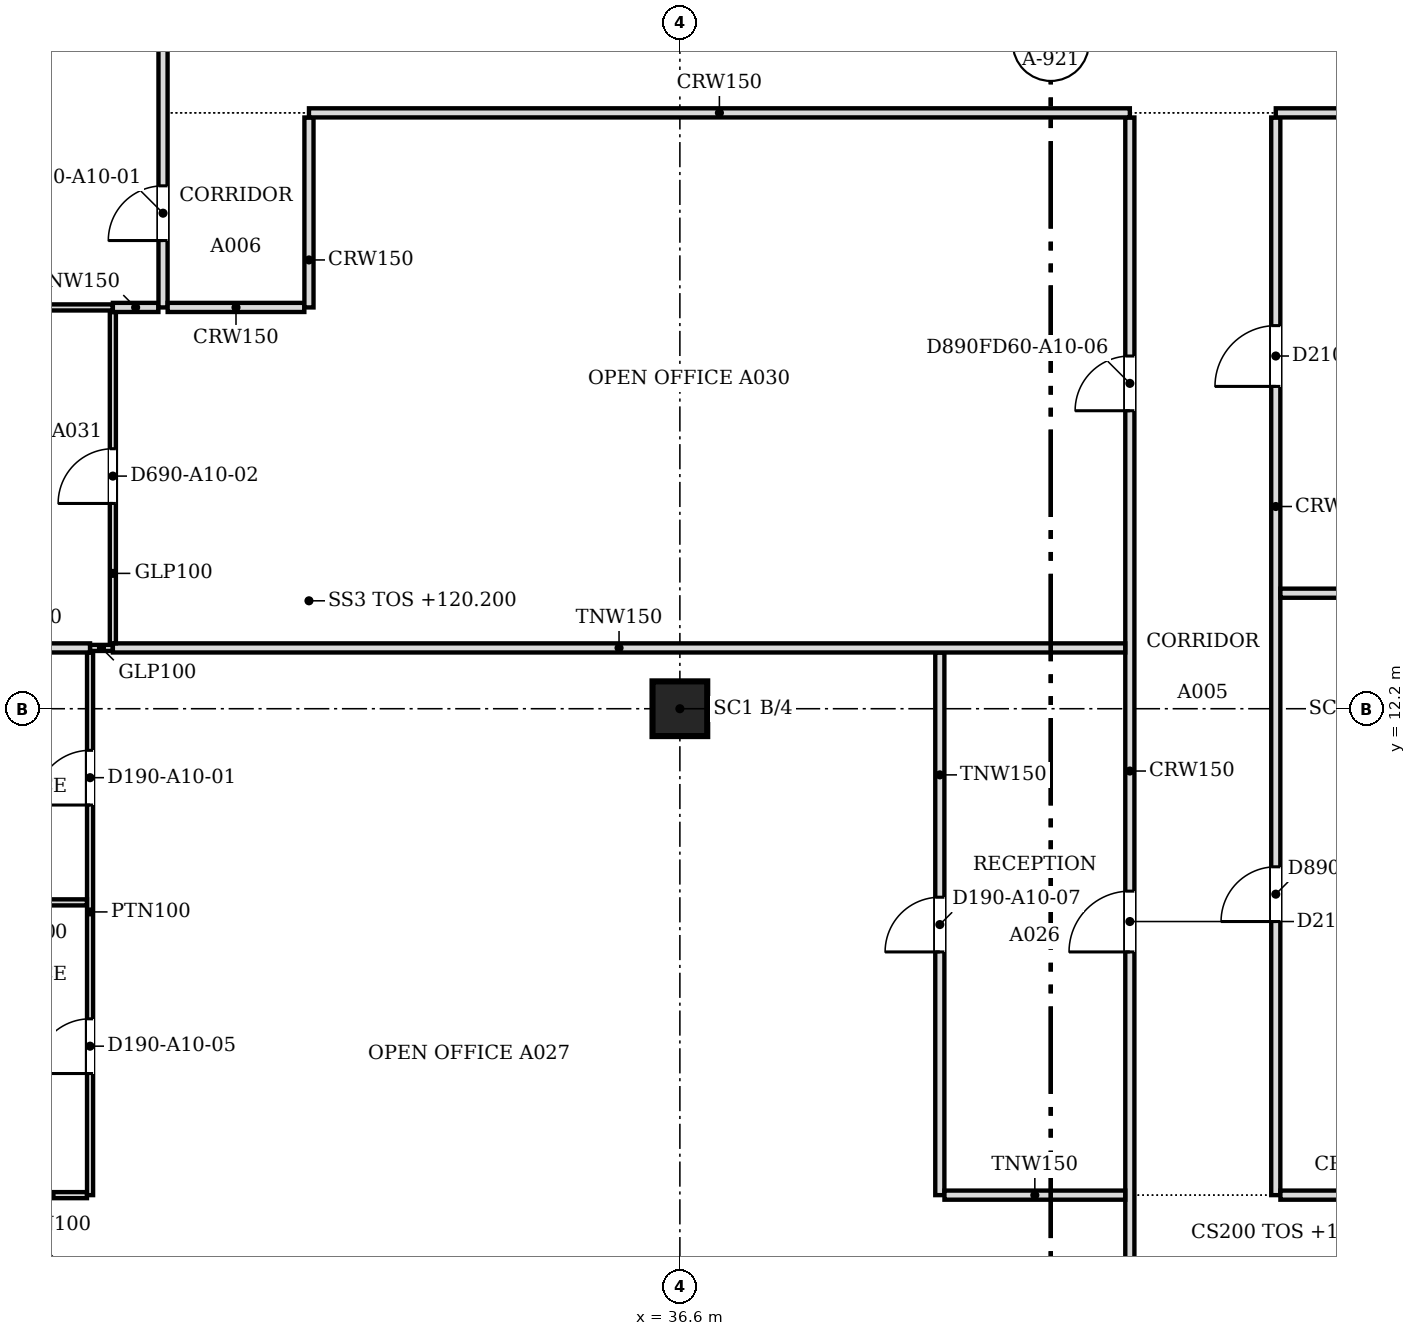
"""IFC4 building model, lengths in metres.
Left out: names, types, materials, properties, quantities, classifications, styles, units other than length and angle.
Written with IfcOpenShell. Run it as: python <this file> out.ifc"""

import sys

from ifc_helpers import new_model, si_unit, direction, frame, frame_2d, origin, origin_2d, place, context, subcontext, project, spatial, polyline, rectangle, outline, extrude, faceted_brep, source, transform, mapped, element, fill, save


model = new_model("IFC4")
c1 = context("Model", 3, precision=1e-05, world=origin(), true_north=direction((0.0, 1.0)))
c2 = subcontext(c1, "Body", "Model", "MODEL_VIEW")
j1 = project(units=[si_unit("LENGTHUNIT", "METRE"), si_unit("PLANEANGLEUNIT", "RADIAN")], contexts=[c1])
p1 = place(None, origin())
s1 = spatial("IfcSite", under=j1, at=p1, CompositionType="ELEMENT")
p2 = place(p1, origin())
s2 = spatial("IfcBuilding", under=s1, at=p2, CompositionType="ELEMENT")
p3 = place(p2, frame((0.0, 0.0, 120.2)))
s3 = spatial("IfcBuildingStorey", under=s2, at=p3, CompositionType="ELEMENT", Elevation=120.2)
p4 = place(p3, frame((36.6, 12.2, 0.0), z_axis=(0.0, 0.0, 1.0), x_axis=(1.0, 0.0, 0.0)))
e1 = element("IfcColumn", 1, at=p4, inside=s3, PredefinedType="COLUMN", context=c2, shape_type="SweptSolid", body=[
    extrude(rectangle(XDim=0.9, YDim=0.9, at=origin_2d()), origin(), (0.0, 0.0, 1.0), 3.6),
])
m1 = source(origin(), c2, "Body", "Brep", [
    faceted_brep([(0.053, -0.25, 0.0), (2.997, -0.25, 3.8), (0.053, -0.25, 7.6), (0.0, -0.25, 7.532), (0.0, -0.25, 0.068), (0.106, 0.25, 7.532), (2.944, 0.25, 3.868), (2.944, 0.25, 3.732), (0.106, 0.25, 0.068), (2.997, 0.0, 3.8), (0.053, 0.0, 0.0), (0.053, 0.0, 7.6)], [[[0, 1, 2, 3, 4]], [[5, 6, 7, 8]], [[8, 7, 9, 1, 0, 10]], [[6, 5, 11, 2, 1, 9]], [[3, 2, 11]], [[10, 0, 4]], [[8, 10, 4, 3, 11, 5]], [[9, 7, 6]]]),
])
p5 = place(p3, frame((25.675, 3.431, -3.8), z_axis=(0.0, 0.0, 1.0), x_axis=(0.707106781187, -0.707106781187, 0.0)))
e2 = element("IfcWall", 2, at=p5, inside=s3, PredefinedType="SOLIDWALL", context=c2, shape_type="MappedRepresentation", body=[
    mapped(m1, transform((0.0, 0.0, 0.0), scale=1.0)),
])
m2 = source(origin(), c2, "Body", "SweptSolid", [
    extrude(outline(polyline([(0.253, 0.667), (2.681, 3.8), (0.253, 6.934), (0.253, 0.667)])), frame((0.0, 0.26, 0.0), z_axis=(0.0, -1.0, 0.0), x_axis=(1.0, 0.0, 0.0)), (0.0, 0.0, 1.0), 0.52),
])
p6 = place(p5, origin())
e3 = element("IfcOpeningElement", 3, at=p6, cuts=e2, PredefinedType="OPENING", context=c2, shape_type="MappedRepresentation", body=[
    mapped(m2, transform((0.0, 0.0, 0.0), scale=1.0)),
])
p7 = place(p2, frame((0.0, 0.0, 124.0)))
s4 = spatial("IfcBuildingStorey", under=s2, at=p7, CompositionType="ELEMENT", Elevation=124.0)
m3 = source(origin(), c2, "Body", "Brep", [
    faceted_brep([(2.944, -0.25, 0.0), (2.997, -0.25, 0.068), (2.997, -0.25, 7.532), (2.944, -0.25, 7.6), (0.0, -0.25, 3.8), (0.053, 0.25, 3.868), (2.891, 0.25, 7.532), (2.891, 0.25, 0.068), (0.053, 0.25, 3.732), (2.944, 0.0, 0.0), (2.944, 0.0, 7.6), (0.0, 0.0, 3.8)], [[[0, 1, 2, 3, 4]], [[5, 6, 7, 8]], [[1, 0, 9]], [[10, 3, 2]], [[6, 5, 11, 4, 3, 10]], [[8, 7, 9, 0, 4, 11]], [[8, 11, 5]], [[1, 9, 7, 6, 10, 2]]]),
])
p8 = place(p7, frame((25.712, 3.394, -3.8), z_axis=(0.0, 0.0, 1.0), x_axis=(0.707066050402, -0.707147509625, 0.0)))
e4 = element("IfcWall", 4, at=p8, inside=s4, PredefinedType="SOLIDWALL", context=c2, shape_type="MappedRepresentation", body=[
    mapped(m3, transform((0.0, 0.0, 0.0), scale=1.0)),
])
m4 = source(origin(), c2, "Body", "SweptSolid", [
    extrude(outline(polyline([(2.744, 6.934), (0.316, 3.8), (2.744, 0.666), (2.744, 6.934)])), frame((0.0, 0.26, 0.0), z_axis=(0.0, -1.0, 0.0), x_axis=(1.0, 0.0, 0.0)), (0.0, 0.0, 1.0), 0.52),
])
p9 = place(p8, origin())
e5 = element("IfcOpeningElement", 5, at=p9, cuts=e4, PredefinedType="OPENING", context=c2, shape_type="MappedRepresentation", body=[
    mapped(m4, transform((0.0, 0.0, 0.0), scale=1.0)),
])
p10 = place(p3, frame((44.0, 0.5, 0.0), z_axis=(0.0, 0.0, 1.0), x_axis=(0.0, 1.0, 0.0)))
e6 = element("IfcWall", 6, at=p10, inside=s3, PredefinedType="PARTITIONING", context=c2, shape_type="SweptSolid", body=[
    extrude(rectangle(XDim=21.424, YDim=0.15, at=frame_2d((10.712, 0.0))), origin(), (0.0, 0.0, 1.0), 3.067),
])
m5 = source(origin(), c2, "Body", "SweptSolid", [
    extrude(rectangle(XDim=0.9, YDim=2.1, at=frame_2d((0.45, 1.05))), frame((0.0, 0.085, 0.0), z_axis=(0.0, -1.0, 0.0), x_axis=(1.0, 0.0, 0.0)), (0.0, 0.0, 1.0), 0.17),
])
p11 = place(p10, frame((16.601, 0.0, 0.0)))
e7 = element("IfcOpeningElement", 7, at=p11, cuts=e6, PredefinedType="OPENING", context=c2, shape_type="MappedRepresentation", body=[
    mapped(m5, transform((0.0, 0.0, 0.0), scale=1.0)),
])
m6 = source(origin(), c2, "Body", "SweptSolid", [
    extrude(rectangle(XDim=1.0, YDim=2.1, at=frame_2d((0.5, 1.05))), frame((0.0, 0.085, 0.0), z_axis=(0.0, -1.0, 0.0), x_axis=(1.0, 0.0, 0.0)), (0.0, 0.0, 1.0), 0.17),
])
p12 = place(p10, frame((7.7, 0.0, 0.0)))
e8 = element("IfcOpeningElement", 8, at=p12, cuts=e6, PredefinedType="OPENING", context=c2, shape_type="MappedRepresentation", body=[
    mapped(m6, transform((0.0, 0.0, 0.0), scale=1.0)),
])
p13 = place(p3, frame((25.669, 4.2, 0.0), z_axis=(0.0, 0.0, 1.0), x_axis=(1.0, 0.0, 0.0)))
e9 = element("IfcWall", 9, at=p13, inside=s3, PredefinedType="PARTITIONING", context=c2, shape_type="SweptSolid", body=[
    extrude(rectangle(XDim=1.18, YDim=0.1, at=frame_2d((0.59, 0.0))), origin(), (0.0, 0.0, 1.0), 3.067),
])
p14 = place(p3, frame((26.9, 4.2, 0.0), z_axis=(0.0, 0.0, 1.0), x_axis=(0.0, 1.0, 0.0)))
e10 = element("IfcWall", 10, at=p14, inside=s3, PredefinedType="PARTITIONING", context=c2, shape_type="SweptSolid", body=[
    extrude(rectangle(XDim=8.924, YDim=0.1, at=frame_2d((4.462, 0.0))), origin(), (0.0, 0.0, 1.0), 3.067),
])
m7 = source(origin(), c2, "Body", "SweptSolid", [
    extrude(rectangle(XDim=0.9, YDim=2.1, at=frame_2d((0.45, 1.05))), frame((0.0, 0.06, 0.0), z_axis=(0.0, -1.0, 0.0), x_axis=(1.0, 0.0, 0.0)), (0.0, 0.0, 1.0), 0.12),
])
p15 = place(p14, frame((6.416, 0.0, 0.0)))
e11 = element("IfcOpeningElement", 11, at=p15, cuts=e10, PredefinedType="OPENING", context=c2, shape_type="MappedRepresentation", body=[
    mapped(m7, transform((0.0, 0.0, 0.0), scale=1.0)),
])
p16 = place(p14, frame((2.0, 0.0, 0.0)))
e12 = element("IfcOpeningElement", 12, at=p16, cuts=e10, PredefinedType="OPENING", context=c2, shape_type="MappedRepresentation", body=[
    mapped(m7, transform((0.0, 0.0, 0.0), scale=1.0)),
])
p17 = place(p3, frame((40.875, 4.2, 0.0), z_axis=(0.0, 0.0, 1.0), x_axis=(0.0, 1.0, 0.0)))
e13 = element("IfcWall", 13, at=p17, inside=s3, PredefinedType="PARTITIONING", context=c2, shape_type="SweptSolid", body=[
    extrude(rectangle(XDim=8.924, YDim=0.15, at=frame_2d((4.462, 0.0))), origin(), (0.0, 0.0, 1.0), 3.067),
])
p18 = place(p17, frame((4.0, 0.0, 0.0)))
e14 = element("IfcOpeningElement", 14, at=p18, cuts=e13, PredefinedType="OPENING", context=c2, shape_type="MappedRepresentation", body=[
    mapped(m5, transform((0.0, 0.0, 0.0), scale=1.0)),
])
p19 = place(p3, frame((40.951, 4.2, 0.0), z_axis=(0.0, 0.0, 1.0), x_axis=(1.0, 0.0, 0.0)))
e15 = element("IfcWall", 15, at=p19, inside=s3, PredefinedType="PARTITIONING", context=c2, shape_type="SweptSolid", body=[
    extrude(rectangle(XDim=2.973, YDim=0.15, at=frame_2d((1.487, 0.0))), origin(), (0.0, 0.0, 1.0), 3.067),
])
p20 = place(p3, frame((46.4, 21.924, 0.0), z_axis=(0.0, 0.0, 1.0), x_axis=(0.0, -1.0, 0.0)))
e16 = element("IfcWall", 16, at=p20, inside=s3, PredefinedType="PARTITIONING", context=c2, shape_type="SweptSolid", body=[
    extrude(rectangle(XDim=17.724, YDim=0.15, at=frame_2d((8.862, 0.0))), origin(), (0.0, 0.0, 1.0), 3.067),
])
p21 = place(p20, frame((3.423, 0.0, 0.0)))
e17 = element("IfcOpeningElement", 17, at=p21, cuts=e16, PredefinedType="OPENING", context=c2, shape_type="MappedRepresentation", body=[
    mapped(m6, transform((0.0, 0.0, 0.0), scale=1.0)),
])
p22 = place(p20, frame((12.324, 0.0, 0.0)))
e18 = element("IfcOpeningElement", 18, at=p22, cuts=e16, PredefinedType="OPENING", context=c2, shape_type="MappedRepresentation", body=[
    mapped(m5, transform((0.0, 0.0, 0.0), scale=1.0)),
])
p23 = place(p3, frame((46.476, 4.2, 0.0), z_axis=(0.0, 0.0, 1.0), x_axis=(1.0, 0.0, 0.0)))
e19 = element("IfcWall", 19, at=p23, inside=s3, PredefinedType="PARTITIONING", context=c2, shape_type="SweptSolid", body=[
    extrude(rectangle(XDim=2.524, YDim=0.15, at=frame_2d((1.262, 0.0))), origin(), (0.0, 0.0, 1.0), 3.067),
])
p24 = place(p3, frame((24.9, 9.015, 0.0), z_axis=(0.0, 0.0, 1.0), x_axis=(1.0, 0.0, 0.0)))
e20 = element("IfcWall", 20, at=p24, inside=s3, PredefinedType="PARTITIONING", context=c2, shape_type="SweptSolid", body=[
    extrude(rectangle(XDim=1.949, YDim=0.1, at=frame_2d((0.975, 0.0))), origin(), (0.0, 0.0, 1.0), 3.067),
])
p25 = place(p3, frame((24.55, 13.2, 0.0), z_axis=(0.0, 0.0, 1.0), x_axis=(1.0, 0.0, 0.0)))
e21 = element("IfcWall", 21, at=p25, inside=s3, PredefinedType="PARTITIONING", context=c2, shape_type="SweptSolid", body=[
    extrude(rectangle(XDim=2.35, YDim=0.15, at=frame_2d((1.175, 0.0))), origin(), (0.0, 0.0, 1.0), 3.067),
])
p26 = place(p3, frame((26.901, 13.2, 0.0), z_axis=(0.0, 0.0, 1.0), x_axis=(1.0, 0.0, 0.0)))
e22 = element("IfcWall", 22, at=p26, inside=s3, PredefinedType="PARTITIONING", context=c2, shape_type="SweptSolid", body=[
    extrude(rectangle(XDim=0.373, YDim=0.1, at=frame_2d((0.187, 0.0))), origin(), (0.0, 0.0, 1.0), 3.067),
])
p27 = place(p3, frame((27.275, 13.2, 0.0), z_axis=(0.0, 0.0, 1.0), x_axis=(1.0, 0.0, 0.0)))
e23 = element("IfcWall", 23, at=p27, inside=s3, PredefinedType="PARTITIONING", context=c2, shape_type="SweptSolid", body=[
    extrude(rectangle(XDim=16.649, YDim=0.15, at=frame_2d((8.325, 0.0))), origin(), (0.0, 0.0, 1.0), 3.067),
])
p28 = place(p3, frame((27.275, 13.276, 0.0), z_axis=(0.0, 0.0, 1.0), x_axis=(0.0, 1.0, 0.0)))
e24 = element("IfcWall", 24, at=p28, inside=s3, PredefinedType="PARTITIONING", context=c2, shape_type="SweptSolid", body=[
    extrude(rectangle(XDim=5.448, YDim=0.1, at=frame_2d((2.724, 0.0))), origin(), (0.0, 0.0, 1.0), 3.067),
])
p29 = place(p28, frame((2.3, 0.0, 0.0)))
e25 = element("IfcOpeningElement", 25, at=p29, cuts=e24, PredefinedType="OPENING", context=c2, shape_type="MappedRepresentation", body=[
    mapped(m7, transform((0.0, 0.0, 0.0), scale=1.0)),
])
p30 = place(p3, frame((46.476, 14.1, 0.0), z_axis=(0.0, 0.0, 1.0), x_axis=(1.0, 0.0, 0.0)))
e26 = element("IfcWall", 26, at=p30, inside=s3, PredefinedType="PARTITIONING", context=c2, shape_type="SweptSolid", body=[
    extrude(rectangle(XDim=9.164, YDim=0.15, at=frame_2d((4.582, 0.0))), origin(), (0.0, 0.0, 1.0), 3.067),
])
p31 = place(p3, frame((22.0, 18.8, 0.0), z_axis=(0.0, 0.0, 1.0), x_axis=(1.0, 0.0, 0.0)))
e27 = element("IfcWall", 27, at=p31, inside=s3, PredefinedType="PARTITIONING", context=c2, shape_type="SweptSolid", body=[
    extrude(rectangle(XDim=5.274, YDim=0.1, at=frame_2d((2.637, 0.0))), origin(), (0.0, 0.0, 1.0), 3.067),
])
p32 = place(p3, frame((27.275, 18.8, 0.0), z_axis=(0.0, 0.0, 1.0), x_axis=(1.0, 0.0, 0.0)))
e28 = element("IfcWall", 28, at=p32, inside=s3, PredefinedType="PARTITIONING", context=c2, shape_type="SweptSolid", body=[
    extrude(rectangle(XDim=0.749, YDim=0.15, at=frame_2d((0.375, 0.0))), origin(), (0.0, 0.0, 1.0), 3.067),
])
p33 = place(p3, frame((28.1, 18.8, 0.0), z_axis=(0.0, 0.0, 1.0), x_axis=(0.0, 1.0, 0.0)))
e29 = element("IfcWall", 29, at=p33, inside=s3, PredefinedType="PARTITIONING", context=c2, shape_type="SweptSolid", body=[
    extrude(rectangle(XDim=26.024, YDim=0.15, at=frame_2d((13.012, 0.0))), origin(), (0.0, 0.0, 1.0), 3.067),
])
p34 = place(p33, frame((1.1, 0.0, 0.0)))
e30 = element("IfcOpeningElement", 30, at=p34, cuts=e29, PredefinedType="OPENING", context=c2, shape_type="MappedRepresentation", body=[
    mapped(m5, transform((0.0, 0.0, 0.0), scale=1.0)),
])
p35 = place(p33, frame((14.301, 0.0, 0.0)))
e31 = element("IfcOpeningElement", 31, at=p35, cuts=e29, PredefinedType="OPENING", context=c2, shape_type="MappedRepresentation", body=[
    mapped(m5, transform((0.0, 0.0, 0.0), scale=1.0)),
])
p36 = place(p33, frame((8.2, 0.0, 0.0)))
e32 = element("IfcOpeningElement", 32, at=p36, cuts=e29, PredefinedType="OPENING", context=c2, shape_type="MappedRepresentation", body=[
    mapped(m5, transform((0.0, 0.0, 0.0), scale=1.0)),
])
p37 = place(p33, frame((21.5, 0.0, 0.0)))
e33 = element("IfcOpeningElement", 33, at=p37, cuts=e29, PredefinedType="OPENING", context=c2, shape_type="MappedRepresentation", body=[
    mapped(m5, transform((0.0, 0.0, 0.0), scale=1.0)),
])
p38 = place(p3, frame((28.176, 18.8, 0.0), z_axis=(0.0, 0.0, 1.0), x_axis=(1.0, 0.0, 0.0)))
e34 = element("IfcWall", 34, at=p38, inside=s3, PredefinedType="PARTITIONING", context=c2, shape_type="SweptSolid", body=[
    extrude(rectangle(XDim=2.248, YDim=0.15, at=frame_2d((1.124, 0.0))), origin(), (0.0, 0.0, 1.0), 3.067),
])
p39 = place(p3, frame((30.5, 18.8, 0.0), z_axis=(0.0, 0.0, 1.0), x_axis=(0.0, 1.0, 0.0)))
e35 = element("IfcWall", 35, at=p39, inside=s3, PredefinedType="PARTITIONING", context=c2, shape_type="SweptSolid", body=[
    extrude(rectangle(XDim=3.124, YDim=0.15, at=frame_2d((1.562, 0.0))), origin(), (0.0, 0.0, 1.0), 3.067),
])
p40 = place(p3, frame((30.5, 22.0, 0.0), z_axis=(0.0, 0.0, 1.0), x_axis=(1.0, 0.0, 0.0)))
e36 = element("IfcWall", 36, at=p40, inside=s3, PredefinedType="PARTITIONING", context=c2, shape_type="SweptSolid", body=[
    extrude(rectangle(XDim=13.5, YDim=0.15, at=frame_2d((6.75, 0.0))), origin(), (0.0, 0.0, 1.0), 3.067),
])
p41 = place(p3, frame((46.4, 22.0, 0.0), z_axis=(0.0, 0.0, 1.0), x_axis=(1.0, 0.0, 0.0)))
e37 = element("IfcWall", 37, at=p41, inside=s3, PredefinedType="PARTITIONING", context=c2, shape_type="SweptSolid", body=[
    extrude(rectangle(XDim=10.9, YDim=0.15, at=frame_2d((5.45, 0.0))), origin(), (0.0, 0.0, 1.0), 3.067),
])
m8 = source(origin(), c2, "Body", "SweptSolid", [
    extrude(rectangle(XDim=0.9, YDim=2.1, at=frame_2d((0.45, 1.05))), frame((0.0, 0.025, 0.0), z_axis=(0.0, -1.0, 0.0), x_axis=(1.0, 0.0, 0.0)), (0.0, 0.0, 1.0), 0.05),
])
p42 = place(p34, origin())
e38 = element("IfcDoor", 38, at=p42, inside=s3, OperationType="SINGLE_SWING_LEFT", PredefinedType="DOOR", context=c2, shape_type="MappedRepresentation", body=[
    mapped(m8, transform((0.0, 0.0, 0.0), scale=1.0)),
])
fill(e30, e38)
p43 = place(p15, origin())
e39 = element("IfcDoor", 39, at=p43, inside=s3, OperationType="SINGLE_SWING_LEFT", PredefinedType="DOOR", context=c2, shape_type="MappedRepresentation", body=[
    mapped(m8, transform((0.0, 0.0, 0.0), scale=1.0)),
])
fill(e11, e39)
p44 = place(p29, origin())
e40 = element("IfcDoor", 40, at=p44, inside=s3, OperationType="SINGLE_SWING_LEFT", PredefinedType="DOOR", context=c2, shape_type="MappedRepresentation", body=[
    mapped(m8, transform((0.0, 0.0, 0.0), scale=1.0)),
])
fill(e25, e40)
p45 = place(p16, origin())
e41 = element("IfcDoor", 41, at=p45, inside=s3, OperationType="SINGLE_SWING_LEFT", PredefinedType="DOOR", context=c2, shape_type="MappedRepresentation", body=[
    mapped(m8, transform((0.0, 0.0, 0.0), scale=1.0)),
])
fill(e12, e41)
m9 = source(origin(), c2, "Body", "SweptSolid", [
    extrude(rectangle(XDim=1.0, YDim=2.1, at=frame_2d((0.5, 1.05))), frame((0.0, 0.025, 0.0), z_axis=(0.0, -1.0, 0.0), x_axis=(1.0, 0.0, 0.0)), (0.0, 0.0, 1.0), 0.05),
])
p46 = place(p21, origin())
e42 = element("IfcDoor", 42, at=p46, inside=s3, OperationType="SINGLE_SWING_RIGHT", PredefinedType="DOOR", context=c2, shape_type="MappedRepresentation", body=[
    mapped(m9, transform((0.0, 0.0, 0.0), scale=1.0)),
])
fill(e17, e42)
p47 = place(p11, origin())
e43 = element("IfcDoor", 43, at=p47, inside=s3, OperationType="SINGLE_SWING_LEFT", PredefinedType="DOOR", context=c2, shape_type="MappedRepresentation", body=[
    mapped(m8, transform((0.0, 0.0, 0.0), scale=1.0)),
])
fill(e7, e43)
p48 = place(p12, origin())
e44 = element("IfcDoor", 44, at=p48, inside=s3, OperationType="SINGLE_SWING_LEFT", PredefinedType="DOOR", context=c2, shape_type="MappedRepresentation", body=[
    mapped(m9, transform((0.0, 0.0, 0.0), scale=1.0)),
])
fill(e8, e44)
p49 = place(p22, origin())
e45 = element("IfcDoor", 45, at=p49, inside=s3, OperationType="SINGLE_SWING_RIGHT", PredefinedType="DOOR", context=c2, shape_type="MappedRepresentation", body=[
    mapped(m8, transform((0.0, 0.0, 0.0), scale=1.0)),
])
fill(e18, e45)
p50 = place(p18, origin())
e46 = element("IfcDoor", 46, at=p50, inside=s3, OperationType="SINGLE_SWING_LEFT", PredefinedType="DOOR", context=c2, shape_type="MappedRepresentation", body=[
    mapped(m8, transform((0.0, 0.0, 0.0), scale=1.0)),
])
fill(e14, e46)
save(model, sys.argv[1])
